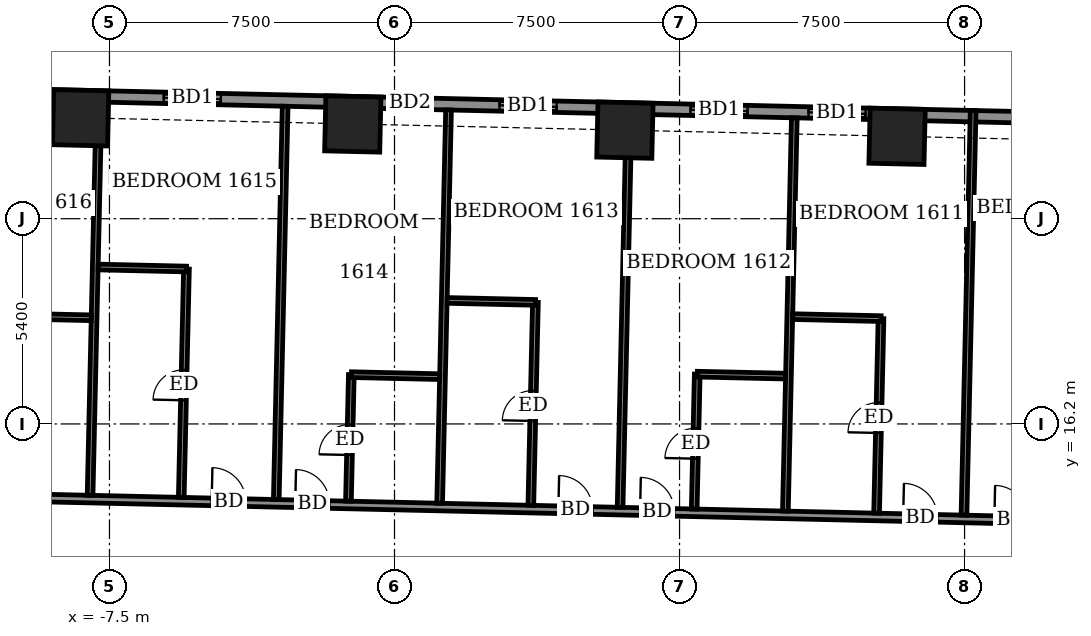
"""IFC4 building model, lengths in metres.
Left out: names, types, materials, properties, quantities, classifications, styles, units other than length and angle.
Written with IfcOpenShell. Run it as: python <this file> out.ifc"""

import sys

from ifc_helpers import new_model, si_unit, direction, frame, frame_2d, origin, origin_2d, place, context, subcontext, project, spatial, rectangle, extrude, element, fill, save


model = new_model("IFC4")
c1 = context("Model", 3, precision=1e-05, world=origin(), true_north=direction((0.0, 1.0)))
c2 = subcontext(c1, "Body", "Model", "MODEL_VIEW")
j1 = project(units=[si_unit("LENGTHUNIT", "METRE"), si_unit("PLANEANGLEUNIT", "RADIAN")], contexts=[c1])
p1 = place(None, origin())
s1 = spatial("IfcSite", under=j1, at=p1, CompositionType="ELEMENT")
p2 = place(p1, origin())
s2 = spatial("IfcBuilding", under=s1, at=p2, CompositionType="ELEMENT")
p3 = place(p2, frame((0.0, 0.0, 67.5)))
s3 = spatial("IfcBuildingStorey", under=s2, at=p3, CompositionType="ELEMENT", Elevation=67.5)
for number, where, z_axis, x_axis in (
    (1, (13.224, 23.768, -0.55), (0.0, 0.0, 1.0), (-1.0, 0.023, 0.0)),
    (2, (6.062, 23.93, -0.55), (0.0, 0.0, 1.0), (-1.0, 0.023, 0.0)),
    (3, (-1.097, 24.093, -0.55), (0.0, 0.0, 1.0), (-1.0, 0.023, 0.0)),
    (4, (-8.259, 24.255, -0.55), (0.0, 0.0, 1.0), (-1.0, 0.023, 0.0)),
):
    element("IfcColumn", number, at=place(p3, frame(where, z_axis=z_axis, x_axis=x_axis)), inside=s3, PredefinedType="COLUMN", context=c2, shape_type="SweptSolid", body=[
        extrude(rectangle(XDim=1.45, YDim=1.45, at=origin_2d()), origin(), (0.0, 0.0, 1.0), 3.6),
    ])
p4 = place(p3, frame((27.407, 24.021, 0.0), z_axis=(0.0, 0.0, 1.0), x_axis=(-0.99974239923, 0.022696589664, 0.0)))
e5 = element("IfcWall", 5, at=p4, inside=s3, PredefinedType="SOLIDWALL", context=c2, shape_type="SweptSolid", body=[
    extrude(rectangle(XDim=49.836, YDim=0.3, at=frame_2d((24.918, 0.0))), origin(), (0.0, 0.0, 1.0), 3.05),
])
p5 = place(p4, frame((2.998, 0.0, 0.0)))
e6 = element("IfcOpeningElement", 6, at=p5, cuts=e5, PredefinedType="OPENING", context=c2, shape_type="SweptSolid", body=[
    extrude(rectangle(XDim=1.5, YDim=2.4, at=frame_2d((0.75, 1.2))), frame((0.0, 0.16, 0.0), z_axis=(0.0, -1.0, 0.0), x_axis=(1.0, 0.0, 0.0)), (0.0, 0.0, 1.0), 0.32),
])
p6 = place(p4, frame((9.086, 0.0, 0.0)))
e7 = element("IfcOpeningElement", 7, at=p6, cuts=e5, PredefinedType="OPENING", context=c2, shape_type="SweptSolid", body=[
    extrude(rectangle(XDim=1.5, YDim=2.4, at=frame_2d((0.75, 1.2))), frame((0.0, 0.16, 0.0), z_axis=(0.0, -1.0, 0.0), x_axis=(1.0, 0.0, 0.0)), (0.0, 0.0, 1.0), 0.32),
])
p7 = place(p4, frame((15.017, 0.0, 0.0)))
e8 = element("IfcOpeningElement", 8, at=p7, cuts=e5, PredefinedType="OPENING", context=c2, shape_type="SweptSolid", body=[
    extrude(rectangle(XDim=1.5, YDim=2.4, at=frame_2d((0.75, 1.2))), frame((0.0, 0.16, 0.0), z_axis=(0.0, -1.0, 0.0), x_axis=(1.0, 0.0, 0.0)), (0.0, 0.0, 1.0), 0.32),
])
p8 = place(p4, frame((18.124, 0.0, 0.0)))
e9 = element("IfcOpeningElement", 9, at=p8, cuts=e5, PredefinedType="OPENING", context=c2, shape_type="SweptSolid", body=[
    extrude(rectangle(XDim=1.5, YDim=2.4, at=frame_2d((0.75, 1.2))), frame((0.0, 0.16, 0.0), z_axis=(0.0, -1.0, 0.0), x_axis=(1.0, 0.0, 0.0)), (0.0, 0.0, 1.0), 0.32),
])
p9 = place(p4, frame((23.149, 0.0, 0.0)))
e10 = element("IfcOpeningElement", 10, at=p9, cuts=e5, PredefinedType="OPENING", context=c2, shape_type="SweptSolid", body=[
    extrude(rectangle(XDim=1.5, YDim=2.4, at=frame_2d((0.75, 1.2))), frame((0.0, 0.16, 0.0), z_axis=(0.0, -1.0, 0.0), x_axis=(1.0, 0.0, 0.0)), (0.0, 0.0, 1.0), 0.32),
])
p10 = place(p4, frame((26.405, 0.0, 0.0)))
e11 = element("IfcOpeningElement", 11, at=p10, cuts=e5, PredefinedType="OPENING", context=c2, shape_type="SweptSolid", body=[
    extrude(rectangle(XDim=1.2, YDim=2.4, at=frame_2d((0.6, 1.2))), frame((0.0, 0.16, 0.0), z_axis=(0.0, -1.0, 0.0), x_axis=(1.0, 0.0, 0.0)), (0.0, 0.0, 1.0), 0.32),
])
p11 = place(p4, frame((31.986, 0.0, 0.0)))
e12 = element("IfcOpeningElement", 12, at=p11, cuts=e5, PredefinedType="OPENING", context=c2, shape_type="SweptSolid", body=[
    extrude(rectangle(XDim=1.5, YDim=2.4, at=frame_2d((0.75, 1.2))), frame((0.0, 0.16, 0.0), z_axis=(0.0, -1.0, 0.0), x_axis=(1.0, 0.0, 0.0)), (0.0, 0.0, 1.0), 0.32),
])
p12 = place(p4, frame((37.211, 0.0, 0.0)))
e13 = element("IfcOpeningElement", 13, at=p12, cuts=e5, PredefinedType="OPENING", context=c2, shape_type="SweptSolid", body=[
    extrude(rectangle(XDim=1.5, YDim=2.4, at=frame_2d((0.75, 1.2))), frame((0.0, 0.16, 0.0), z_axis=(0.0, -1.0, 0.0), x_axis=(1.0, 0.0, 0.0)), (0.0, 0.0, 1.0), 0.32),
])
p13 = place(p4, frame((40.317, 0.0, 0.0)))
e14 = element("IfcOpeningElement", 14, at=p13, cuts=e5, PredefinedType="OPENING", context=c2, shape_type="SweptSolid", body=[
    extrude(rectangle(XDim=1.5, YDim=2.4, at=frame_2d((0.75, 1.2))), frame((0.0, 0.16, 0.0), z_axis=(0.0, -1.0, 0.0), x_axis=(1.0, 0.0, 0.0)), (0.0, 0.0, 1.0), 0.32),
])
p14 = place(p4, frame((45.431, 0.0, 0.9)))
e15 = element("IfcOpeningElement", 15, at=p14, cuts=e5, PredefinedType="OPENING", context=c2, shape_type="SweptSolid", body=[
    extrude(rectangle(XDim=2.4, YDim=1.5, at=frame_2d((1.2, 0.75))), frame((0.0, 0.16, 0.0), z_axis=(0.0, -1.0, 0.0), x_axis=(1.0, 0.0, 0.0)), (0.0, 0.0, 1.0), 0.32),
])
p15 = place(p3, frame((-25.481, 14.619, 0.0), z_axis=(0.0, 0.0, 1.0), x_axis=(0.999742349682, -0.022698772048, 0.0)))
e16 = element("IfcWall", 16, at=p15, inside=s3, PredefinedType="PARTITIONING", context=c2, shape_type="SweptSolid", body=[
    extrude(rectangle(XDim=54.886, YDim=0.2, at=frame_2d((27.443, 0.0))), origin(), (0.0, 0.0, 1.0), 3.05),
])
p16 = place(p15, frame((52.093, 0.0, 0.0)))
e17 = element("IfcOpeningElement", 17, at=p16, cuts=e16, PredefinedType="OPENING", context=c2, shape_type="SweptSolid", body=[
    extrude(rectangle(XDim=1.0, YDim=2.1, at=frame_2d((0.5, 1.05))), frame((0.0, 0.11, 0.0), z_axis=(0.0, -1.0, 0.0), x_axis=(1.0, 0.0, 0.0)), (0.0, 0.0, 1.0), 0.22),
])
p17 = place(p15, frame((46.325, 0.0, 0.0)))
e18 = element("IfcOpeningElement", 18, at=p17, cuts=e16, PredefinedType="OPENING", context=c2, shape_type="SweptSolid", body=[
    extrude(rectangle(XDim=0.9, YDim=2.1, at=frame_2d((0.45, 1.05))), frame((0.0, 0.11, 0.0), z_axis=(0.0, -1.0, 0.0), x_axis=(1.0, 0.0, 0.0)), (0.0, 0.0, 1.0), 0.22),
])
p18 = place(p15, frame((41.275, 0.0, 0.0)))
e19 = element("IfcOpeningElement", 19, at=p18, cuts=e16, PredefinedType="OPENING", context=c2, shape_type="SweptSolid", body=[
    extrude(rectangle(XDim=0.9, YDim=2.1, at=frame_2d((0.45, 1.05))), frame((0.0, 0.11, 0.0), z_axis=(0.0, -1.0, 0.0), x_axis=(1.0, 0.0, 0.0)), (0.0, 0.0, 1.0), 0.22),
])
p19 = place(p15, frame((38.875, 0.0, 0.0)))
e20 = element("IfcOpeningElement", 20, at=p19, cuts=e16, PredefinedType="OPENING", context=c2, shape_type="SweptSolid", body=[
    extrude(rectangle(XDim=0.9, YDim=2.1, at=frame_2d((0.45, 1.05))), frame((0.0, 0.11, 0.0), z_axis=(0.0, -1.0, 0.0), x_axis=(1.0, 0.0, 0.0)), (0.0, 0.0, 1.0), 0.22),
])
p20 = place(p15, frame((31.95, 0.0, 0.0)))
e21 = element("IfcOpeningElement", 21, at=p20, cuts=e16, PredefinedType="OPENING", context=c2, shape_type="SweptSolid", body=[
    extrude(rectangle(XDim=0.9, YDim=2.1, at=frame_2d((0.45, 1.05))), frame((0.0, 0.11, 0.0), z_axis=(0.0, -1.0, 0.0), x_axis=(1.0, 0.0, 0.0)), (0.0, 0.0, 1.0), 0.22),
])
p21 = place(p15, frame((29.8, 0.0, 0.0)))
e22 = element("IfcOpeningElement", 22, at=p21, cuts=e16, PredefinedType="OPENING", context=c2, shape_type="SweptSolid", body=[
    extrude(rectangle(XDim=0.9, YDim=2.1, at=frame_2d((0.45, 1.05))), frame((0.0, 0.11, 0.0), z_axis=(0.0, -1.0, 0.0), x_axis=(1.0, 0.0, 0.0)), (0.0, 0.0, 1.0), 0.22),
])
p22 = place(p15, frame((22.875, 0.0, 0.0)))
e23 = element("IfcOpeningElement", 23, at=p22, cuts=e16, PredefinedType="OPENING", context=c2, shape_type="SweptSolid", body=[
    extrude(rectangle(XDim=0.9, YDim=2.1, at=frame_2d((0.45, 1.05))), frame((0.0, 0.11, 0.0), z_axis=(0.0, -1.0, 0.0), x_axis=(1.0, 0.0, 0.0)), (0.0, 0.0, 1.0), 0.22),
])
p23 = place(p15, frame((20.675, 0.0, 0.0)))
e24 = element("IfcOpeningElement", 24, at=p23, cuts=e16, PredefinedType="OPENING", context=c2, shape_type="SweptSolid", body=[
    extrude(rectangle(XDim=0.9, YDim=2.1, at=frame_2d((0.45, 1.05))), frame((0.0, 0.11, 0.0), z_axis=(0.0, -1.0, 0.0), x_axis=(1.0, 0.0, 0.0)), (0.0, 0.0, 1.0), 0.22),
])
p24 = place(p15, frame((13.525, 0.0, 0.0)))
e25 = element("IfcOpeningElement", 25, at=p24, cuts=e16, PredefinedType="OPENING", context=c2, shape_type="SweptSolid", body=[
    extrude(rectangle(XDim=0.9, YDim=2.1, at=frame_2d((0.45, 1.05))), frame((0.0, 0.11, 0.0), z_axis=(0.0, -1.0, 0.0), x_axis=(1.0, 0.0, 0.0)), (0.0, 0.0, 1.0), 0.22),
])
p25 = place(p15, frame((11.275, 0.0, 0.0)))
e26 = element("IfcOpeningElement", 26, at=p25, cuts=e16, PredefinedType="OPENING", context=c2, shape_type="SweptSolid", body=[
    extrude(rectangle(XDim=0.9, YDim=2.1, at=frame_2d((0.45, 1.05))), frame((0.0, 0.11, 0.0), z_axis=(0.0, -1.0, 0.0), x_axis=(1.0, 0.0, 0.0)), (0.0, 0.0, 1.0), 0.22),
])
p26 = place(p15, frame((3.079, 0.0, 0.0)))
e27 = element("IfcOpeningElement", 27, at=p26, cuts=e16, PredefinedType="OPENING", context=c2, shape_type="SweptSolid", body=[
    extrude(rectangle(XDim=1.0, YDim=2.1, at=frame_2d((0.5, 1.05))), frame((0.0, 0.11, 0.0), z_axis=(0.0, -1.0, 0.0), x_axis=(1.0, 0.0, 0.0)), (0.0, 0.0, 1.0), 0.22),
])
p27 = place(p3, frame((-8.01, 14.322, 0.0), z_axis=(0.0, 0.0, 1.0), x_axis=(0.022714440015, 0.999741993824, 0.0)))
e28 = element("IfcWall", 28, at=p27, inside=s3, PredefinedType="PARTITIONING", context=c2, shape_type="SweptSolid", body=[
    extrude(rectangle(XDim=10.351, YDim=0.15, at=frame_2d((5.175, 0.0))), origin(), (0.0, 0.0, 1.0), 3.05),
])
p28 = place(p3, frame((-5.611, 14.268, 0.0), z_axis=(0.0, 0.0, 1.0), x_axis=(0.022791542349, 0.999740239061, 0.0)))
e29 = element("IfcWall", 29, at=p28, inside=s3, PredefinedType="PARTITIONING", context=c2, shape_type="SweptSolid", body=[
    extrude(rectangle(XDim=6.009, YDim=0.15, at=frame_2d((3.005, 0.0))), origin(), (0.0, 0.0, 1.0), 3.05),
])
p29 = place(p28, frame((2.555, 0.0, 0.0)))
e30 = element("IfcOpeningElement", 30, at=p29, cuts=e29, PredefinedType="OPENING", context=c2, shape_type="SweptSolid", body=[
    extrude(rectangle(XDim=0.8, YDim=2.1, at=frame_2d((0.4, 1.05))), frame((0.0, 0.085, 0.0), z_axis=(0.0, -1.0, 0.0), x_axis=(1.0, 0.0, 0.0)), (0.0, 0.0, 1.0), 0.17),
])
p30 = place(p3, frame((-3.111, 14.211, 0.0), z_axis=(0.0, 0.0, 1.0), x_axis=(0.022621740073, 0.999744095695, 0.0)))
e31 = element("IfcWall", 31, at=p30, inside=s3, PredefinedType="PARTITIONING", context=c2, shape_type="SweptSolid", body=[
    extrude(rectangle(XDim=10.35, YDim=0.15, at=frame_2d((5.175, 0.0))), origin(), (0.0, 0.0, 1.0), 2.55),
])
p31 = place(p3, frame((-1.212, 14.168, 0.0), z_axis=(0.0, 0.0, 1.0), x_axis=(0.022801345323, 0.99974001553, 0.0)))
e32 = element("IfcWall", 32, at=p31, inside=s3, PredefinedType="PARTITIONING", context=c2, shape_type="SweptSolid", body=[
    extrude(rectangle(XDim=3.33, YDim=0.15, at=frame_2d((1.665, 0.0))), origin(), (0.0, 0.0, 1.0), 3.05),
])
p32 = place(p31, frame((1.215, 0.0, 0.0)))
e33 = element("IfcOpeningElement", 33, at=p32, cuts=e32, PredefinedType="OPENING", context=c2, shape_type="SweptSolid", body=[
    extrude(rectangle(XDim=0.8, YDim=2.1, at=frame_2d((0.4, 1.05))), frame((0.0, 0.085, 0.0), z_axis=(0.0, -1.0, 0.0), x_axis=(1.0, 0.0, 0.0)), (0.0, 0.0, 1.0), 0.17),
])
p33 = place(p3, frame((1.188, 14.113, 0.0), z_axis=(0.0, 0.0, 1.0), x_axis=(0.022620139731, 0.999744131905, 0.0)))
e34 = element("IfcWall", 34, at=p33, inside=s3, PredefinedType="PARTITIONING", context=c2, shape_type="SweptSolid", body=[
    extrude(rectangle(XDim=10.351, YDim=0.15, at=frame_2d((5.175, 0.0))), origin(), (0.0, 0.0, 1.0), 2.55),
])
p34 = place(p3, frame((3.587, 14.059, 0.0), z_axis=(0.0, 0.0, 1.0), x_axis=(0.022675711771, 0.999742872991, 0.0)))
e35 = element("IfcWall", 35, at=p34, inside=s3, PredefinedType="PARTITIONING", context=c2, shape_type="SweptSolid", body=[
    extrude(rectangle(XDim=5.34, YDim=0.15, at=frame_2d((2.67, 0.0))), origin(), (0.0, 0.0, 1.0), 3.05),
])
p35 = place(p34, frame((2.22, 0.0, 0.0)))
e36 = element("IfcOpeningElement", 36, at=p35, cuts=e35, PredefinedType="OPENING", context=c2, shape_type="SweptSolid", body=[
    extrude(rectangle(XDim=0.8, YDim=2.1, at=frame_2d((0.4, 1.05))), frame((0.0, 0.085, 0.0), z_axis=(0.0, -1.0, 0.0), x_axis=(1.0, 0.0, 0.0)), (0.0, 0.0, 1.0), 0.17),
])
p36 = place(p3, frame((5.936, 14.006, 0.0), z_axis=(0.0, 0.0, 1.0), x_axis=(0.022693005506, 0.999742480592, 0.0)))
e37 = element("IfcWall", 37, at=p36, inside=s3, PredefinedType="PARTITIONING", context=c2, shape_type="SweptSolid", body=[
    extrude(rectangle(XDim=10.35, YDim=0.15, at=frame_2d((5.175, 0.0))), origin(), (0.0, 0.0, 1.0), 3.05),
])
p37 = place(p3, frame((7.886, 13.961, 0.0), z_axis=(0.0, 0.0, 1.0), x_axis=(0.022557373628, 0.999745550075, 0.0)))
e38 = element("IfcWall", 38, at=p37, inside=s3, PredefinedType="PARTITIONING", context=c2, shape_type="SweptSolid", body=[
    extrude(rectangle(XDim=3.55, YDim=0.15, at=frame_2d((1.775, 0.0))), origin(), (0.0, 0.0, 1.0), 3.05),
])
p38 = place(p37, frame((1.325, 0.0, 0.0)))
e39 = element("IfcOpeningElement", 39, at=p38, cuts=e38, PredefinedType="OPENING", context=c2, shape_type="SweptSolid", body=[
    extrude(rectangle(XDim=0.8, YDim=2.1, at=frame_2d((0.4, 1.05))), frame((0.0, 0.085, 0.0), z_axis=(0.0, -1.0, 0.0), x_axis=(1.0, 0.0, 0.0)), (0.0, 0.0, 1.0), 0.17),
])
p39 = place(p3, frame((10.285, 13.907, 0.0), z_axis=(0.0, 0.0, 1.0), x_axis=(0.022716582742, 0.999741945138, 0.0)))
e40 = element("IfcWall", 40, at=p39, inside=s3, PredefinedType="PARTITIONING", context=c2, shape_type="SweptSolid", body=[
    extrude(rectangle(XDim=10.35, YDim=0.15, at=frame_2d((5.175, 0.0))), origin(), (0.0, 0.0, 1.0), 2.55),
])
p40 = place(p3, frame((12.685, 13.853, 0.0), z_axis=(0.0, 0.0, 1.0), x_axis=(0.02265315592, 0.999743384338, 0.0)))
e41 = element("IfcWall", 41, at=p40, inside=s3, PredefinedType="PARTITIONING", context=c2, shape_type="SweptSolid", body=[
    extrude(rectangle(XDim=5.119, YDim=0.15, at=frame_2d((2.56, 0.0))), origin(), (0.0, 0.0, 1.0), 3.05),
])
p41 = place(p40, frame((2.11, 0.0, 0.0)))
e42 = element("IfcOpeningElement", 42, at=p41, cuts=e41, PredefinedType="OPENING", context=c2, shape_type="SweptSolid", body=[
    extrude(rectangle(XDim=0.8, YDim=2.1, at=frame_2d((0.4, 1.05))), frame((0.0, 0.085, 0.0), z_axis=(0.0, -1.0, 0.0), x_axis=(1.0, 0.0, 0.0)), (0.0, 0.0, 1.0), 0.17),
])
p42 = place(p3, frame((14.984, 13.8, 0.0), z_axis=(0.0, 0.0, 1.0), x_axis=(0.022739109038, 0.999741433032, 0.0)))
e43 = element("IfcWall", 43, at=p42, inside=s3, PredefinedType="PARTITIONING", context=c2, shape_type="SweptSolid", body=[
    extrude(rectangle(XDim=10.651, YDim=0.15, at=frame_2d((5.325, 0.0))), origin(), (0.0, 0.0, 1.0), 2.55),
])
p43 = place(p3, frame((-1.134, 17.497, 0.0), z_axis=(0.0, 0.0, 1.0), x_axis=(0.999740260747, -0.02279059109, 0.0)))
e44 = element("IfcWall", 44, at=p43, inside=s3, PredefinedType="PARTITIONING", context=c2, shape_type="SweptSolid", body=[
    extrude(rectangle(XDim=2.324, YDim=0.15, at=frame_2d((1.162, 0.0))), origin(), (0.0, 0.0, 1.0), 3.05),
])
for number, where, z_axis, x_axis in (
    (45, (7.968, 17.51, 0.0), (0.0, 0.0, 1.0), (1.0, -0.022, 0.0)),
    (46, (-10.302, 19.045, 0.0), (0.0, 0.0, 1.0), (1.0, -0.022, 0.0)),
    (47, (10.478, 19.024, 0.0), (0.0, 0.0, 1.0), (1.0, -0.023, 0.0)),
):
    element("IfcWall", number, at=place(p3, frame(where, z_axis=z_axis, x_axis=x_axis)), inside=s3, PredefinedType="PARTITIONING", context=c2, shape_type="SweptSolid", body=[
        extrude(rectangle(XDim=2.325, YDim=0.15, at=frame_2d((1.163, 0.0))), origin(), (0.0, 0.0, 1.0), 3.05),
    ])
p44 = place(p3, frame((1.386, 19.45, 0.0), z_axis=(0.0, 0.0, 1.0), x_axis=(0.999749744571, -0.022370700241, 0.0)))
e48 = element("IfcWall", 48, at=p44, inside=s3, PredefinedType="PARTITIONING", context=c2, shape_type="SweptSolid", body=[
    extrude(rectangle(XDim=2.324, YDim=0.15, at=frame_2d((1.162, 0.0))), origin(), (0.0, 0.0, 1.0), 3.05),
])
p45 = place(p3, frame((-7.797, 20.329, 0.0), z_axis=(0.0, 0.0, 1.0), x_axis=(0.999738137323, -0.022883548292, 0.0)))
e49 = element("IfcWall", 49, at=p45, inside=s3, PredefinedType="PARTITIONING", context=c2, shape_type="SweptSolid", body=[
    extrude(rectangle(XDim=2.326, YDim=0.15, at=frame_2d((1.163, 0.0))), origin(), (0.0, 0.0, 1.0), 3.05),
])
p46 = place(p7, origin())
e50 = element("IfcDoor", 50, at=p46, inside=s3, OperationType="SLIDING_TO_LEFT", PredefinedType="DOOR", context=c2, shape_type="SweptSolid", body=[
    extrude(rectangle(XDim=1.5, YDim=2.4, at=frame_2d((0.75, 1.2))), frame((0.0, 0.025, 0.0), z_axis=(0.0, -1.0, 0.0), x_axis=(1.0, 0.0, 0.0)), (0.0, 0.0, 1.0), 0.05),
])
fill(e8, e50)
p47 = place(p8, origin())
e51 = element("IfcDoor", 51, at=p47, inside=s3, OperationType="SLIDING_TO_LEFT", PredefinedType="DOOR", context=c2, shape_type="SweptSolid", body=[
    extrude(rectangle(XDim=1.5, YDim=2.4, at=frame_2d((0.75, 1.2))), frame((0.0, 0.025, 0.0), z_axis=(0.0, -1.0, 0.0), x_axis=(1.0, 0.0, 0.0)), (0.0, 0.0, 1.0), 0.05),
])
fill(e9, e51)
p48 = place(p9, origin())
e52 = element("IfcDoor", 52, at=p48, inside=s3, OperationType="SLIDING_TO_LEFT", PredefinedType="DOOR", context=c2, shape_type="SweptSolid", body=[
    extrude(rectangle(XDim=1.5, YDim=2.4, at=frame_2d((0.75, 1.2))), frame((0.0, 0.025, 0.0), z_axis=(0.0, -1.0, 0.0), x_axis=(1.0, 0.0, 0.0)), (0.0, 0.0, 1.0), 0.05),
])
fill(e10, e52)
p49 = place(p10, origin())
e53 = element("IfcDoor", 53, at=p49, inside=s3, OperationType="SLIDING_TO_LEFT", PredefinedType="DOOR", context=c2, shape_type="SweptSolid", body=[
    extrude(rectangle(XDim=1.2, YDim=2.4, at=frame_2d((0.6, 1.2))), frame((0.0, 0.025, 0.0), z_axis=(0.0, -1.0, 0.0), x_axis=(1.0, 0.0, 0.0)), (0.0, 0.0, 1.0), 0.05),
])
fill(e11, e53)
p50 = place(p11, origin())
e54 = element("IfcDoor", 54, at=p50, inside=s3, OperationType="SLIDING_TO_LEFT", PredefinedType="DOOR", context=c2, shape_type="SweptSolid", body=[
    extrude(rectangle(XDim=1.5, YDim=2.4, at=frame_2d((0.75, 1.2))), frame((0.0, 0.025, 0.0), z_axis=(0.0, -1.0, 0.0), x_axis=(1.0, 0.0, 0.0)), (0.0, 0.0, 1.0), 0.05),
])
fill(e12, e54)
p51 = place(p18, origin())
e55 = element("IfcDoor", 55, at=p51, inside=s3, OperationType="SINGLE_SWING_RIGHT", PredefinedType="DOOR", context=c2, shape_type="SweptSolid", body=[
    extrude(rectangle(XDim=0.9, YDim=2.1, at=frame_2d((0.45, 1.05))), frame((0.0, 0.025, 0.0), z_axis=(0.0, -1.0, 0.0), x_axis=(1.0, 0.0, 0.0)), (0.0, 0.0, 1.0), 0.05),
])
fill(e19, e55)
p52 = place(p19, origin())
e56 = element("IfcDoor", 56, at=p52, inside=s3, OperationType="SINGLE_SWING_LEFT", PredefinedType="DOOR", context=c2, shape_type="SweptSolid", body=[
    extrude(rectangle(XDim=0.9, YDim=2.1, at=frame_2d((0.45, 1.05))), frame((0.0, 0.025, 0.0), z_axis=(0.0, -1.0, 0.0), x_axis=(1.0, 0.0, 0.0)), (0.0, 0.0, 1.0), 0.05),
])
fill(e20, e56)
p53 = place(p41, origin())
e57 = element("IfcDoor", 57, at=p53, inside=s3, OperationType="SINGLE_SWING_LEFT", PredefinedType="DOOR", context=c2, shape_type="SweptSolid", body=[
    extrude(rectangle(XDim=0.8, YDim=2.1, at=frame_2d((0.4, 1.05))), frame((0.0, 0.025, 0.0), z_axis=(0.0, -1.0, 0.0), x_axis=(1.0, 0.0, 0.0)), (0.0, 0.0, 1.0), 0.05),
])
fill(e42, e57)
p54 = place(p20, origin())
e58 = element("IfcDoor", 58, at=p54, inside=s3, OperationType="SINGLE_SWING_RIGHT", PredefinedType="DOOR", context=c2, shape_type="SweptSolid", body=[
    extrude(rectangle(XDim=0.9, YDim=2.1, at=frame_2d((0.45, 1.05))), frame((0.0, 0.025, 0.0), z_axis=(0.0, -1.0, 0.0), x_axis=(1.0, 0.0, 0.0)), (0.0, 0.0, 1.0), 0.05),
])
fill(e21, e58)
p55 = place(p38, origin())
e59 = element("IfcDoor", 59, at=p55, inside=s3, OperationType="SINGLE_SWING_RIGHT", PredefinedType="DOOR", context=c2, shape_type="SweptSolid", body=[
    extrude(rectangle(XDim=0.8, YDim=2.1, at=frame_2d((0.4, 1.05))), frame((0.0, 0.025, 0.0), z_axis=(0.0, -1.0, 0.0), x_axis=(1.0, 0.0, 0.0)), (0.0, 0.0, 1.0), 0.05),
])
fill(e39, e59)
p56 = place(p21, origin())
e60 = element("IfcDoor", 60, at=p56, inside=s3, OperationType="SINGLE_SWING_LEFT", PredefinedType="DOOR", context=c2, shape_type="SweptSolid", body=[
    extrude(rectangle(XDim=0.9, YDim=2.1, at=frame_2d((0.45, 1.05))), frame((0.0, 0.025, 0.0), z_axis=(0.0, -1.0, 0.0), x_axis=(1.0, 0.0, 0.0)), (0.0, 0.0, 1.0), 0.05),
])
fill(e22, e60)
p57 = place(p35, origin())
e61 = element("IfcDoor", 61, at=p57, inside=s3, OperationType="SINGLE_SWING_LEFT", PredefinedType="DOOR", context=c2, shape_type="SweptSolid", body=[
    extrude(rectangle(XDim=0.8, YDim=2.1, at=frame_2d((0.4, 1.05))), frame((0.0, 0.025, 0.0), z_axis=(0.0, -1.0, 0.0), x_axis=(1.0, 0.0, 0.0)), (0.0, 0.0, 1.0), 0.05),
])
fill(e36, e61)
p58 = place(p22, origin())
e62 = element("IfcDoor", 62, at=p58, inside=s3, OperationType="SINGLE_SWING_RIGHT", PredefinedType="DOOR", context=c2, shape_type="SweptSolid", body=[
    extrude(rectangle(XDim=0.9, YDim=2.1, at=frame_2d((0.45, 1.05))), frame((0.0, 0.025, 0.0), z_axis=(0.0, -1.0, 0.0), x_axis=(1.0, 0.0, 0.0)), (0.0, 0.0, 1.0), 0.05),
])
fill(e23, e62)
p59 = place(p32, origin())
e63 = element("IfcDoor", 63, at=p59, inside=s3, OperationType="SINGLE_SWING_RIGHT", PredefinedType="DOOR", context=c2, shape_type="SweptSolid", body=[
    extrude(rectangle(XDim=0.8, YDim=2.1, at=frame_2d((0.4, 1.05))), frame((0.0, 0.025, 0.0), z_axis=(0.0, -1.0, 0.0), x_axis=(1.0, 0.0, 0.0)), (0.0, 0.0, 1.0), 0.05),
])
fill(e33, e63)
p60 = place(p23, origin())
e64 = element("IfcDoor", 64, at=p60, inside=s3, OperationType="SINGLE_SWING_LEFT", PredefinedType="DOOR", context=c2, shape_type="SweptSolid", body=[
    extrude(rectangle(XDim=0.9, YDim=2.1, at=frame_2d((0.45, 1.05))), frame((0.0, 0.025, 0.0), z_axis=(0.0, -1.0, 0.0), x_axis=(1.0, 0.0, 0.0)), (0.0, 0.0, 1.0), 0.05),
])
fill(e24, e64)
p61 = place(p29, origin())
e65 = element("IfcDoor", 65, at=p61, inside=s3, OperationType="SINGLE_SWING_LEFT", PredefinedType="DOOR", context=c2, shape_type="SweptSolid", body=[
    extrude(rectangle(XDim=0.8, YDim=2.1, at=frame_2d((0.4, 1.05))), frame((0.0, 0.025, 0.0), z_axis=(0.0, -1.0, 0.0), x_axis=(1.0, 0.0, 0.0)), (0.0, 0.0, 1.0), 0.05),
])
fill(e30, e65)
save(model, sys.argv[1])
